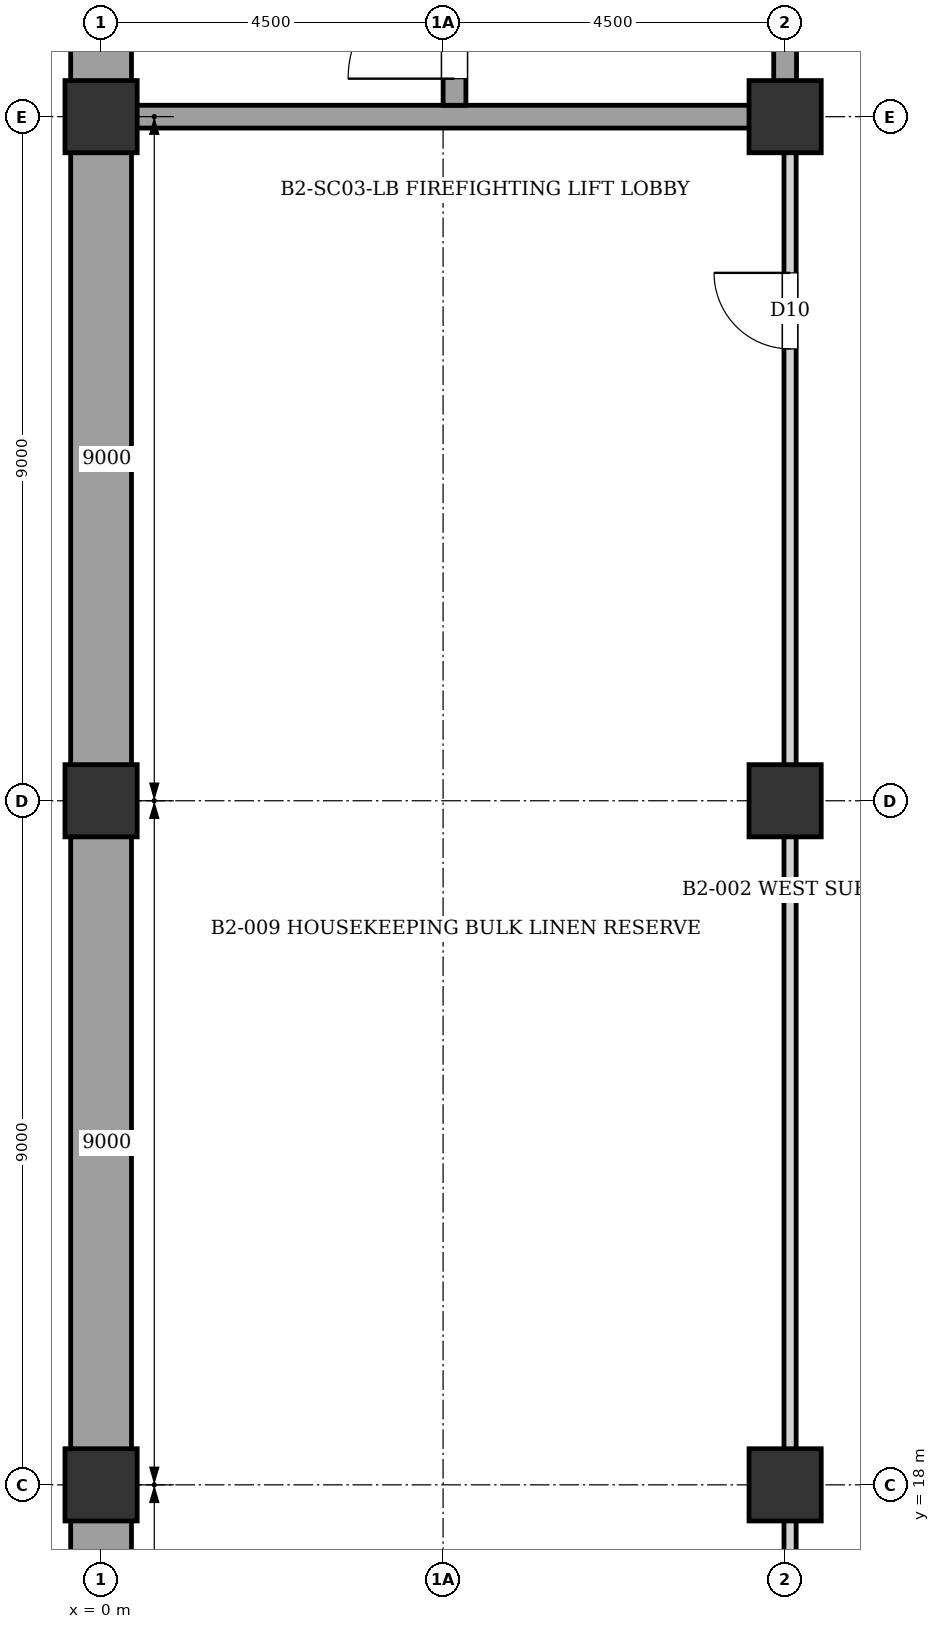
"""IFC4 building model, lengths in metres.
Left out: names, types, materials, properties, quantities, classifications, styles, units other than length and angle.
Written with IfcOpenShell. Run it as: python <this file> out.ifc"""

import sys

from ifc_helpers import new_model, si_unit, direction, frame, frame_2d, origin, origin_2d, place, context, subcontext, project, spatial, rectangle, extrude, element, fill, save


model = new_model("IFC4")
c1 = context("Model", 3, precision=1e-05, world=origin(), true_north=direction((0.0, 1.0)))
c2 = subcontext(c1, "Body", "Model", "MODEL_VIEW")
j1 = project(units=[si_unit("LENGTHUNIT", "METRE"), si_unit("PLANEANGLEUNIT", "RADIAN")], contexts=[c1])
p1 = place(None, origin())
s1 = spatial("IfcSite", under=j1, at=p1, CompositionType="ELEMENT")
p2 = place(p1, origin())
s2 = spatial("IfcBuilding", under=s1, at=p2, CompositionType="ELEMENT")
p3 = place(p2, frame((0.0, 0.0, -8.96)))
s3 = spatial("IfcBuildingStorey", under=s2, at=p3, CompositionType="ELEMENT", Elevation=-8.96)
for number, where, z_axis, x_axis in (
    (1, (0.0, 18.0, 0.0), (0.0, 0.0, 1.0), (1.0, 0.0, 0.0)),
    (2, (0.0, 27.0, 0.0), (0.0, 0.0, 1.0), (1.0, 0.0, 0.0)),
    (3, (0.0, 36.0, 0.0), (0.0, 0.0, 1.0), (1.0, 0.0, 0.0)),
    (4, (9.0, 18.0, 0.0), (0.0, 0.0, 1.0), (1.0, 0.0, 0.0)),
    (5, (9.0, 27.0, 0.0), (0.0, 0.0, 1.0), (1.0, 0.0, 0.0)),
    (6, (9.0, 36.0, 0.0), (0.0, 0.0, 1.0), (1.0, 0.0, 0.0)),
):
    element("IfcColumn", number, at=place(p3, frame(where, z_axis=z_axis, x_axis=x_axis)), inside=s3, PredefinedType="COLUMN", context=c2, shape_type="SweptSolid", body=[
        extrude(rectangle(XDim=0.95, YDim=0.95, at=origin_2d()), origin(), (0.0, 0.0, 1.0), 4.48),
    ])
for number, where, z_axis, x_axis in (
    (7, (0.0, 9.0, 0.0), (0.0, 0.0, 1.0), (0.0, 1.0, 0.0)),
    (8, (0.0, 18.0, 0.0), (0.0, 0.0, 1.0), (0.0, 1.0, 0.0)),
    (9, (0.0, 27.0, 0.0), (0.0, 0.0, 1.0), (0.0, 1.0, 0.0)),
    (10, (0.0, 36.0, 0.0), (0.0, 0.0, 1.0), (0.0, 1.0, 0.0)),
):
    element("IfcWall", number, at=place(p3, frame(where, z_axis=z_axis, x_axis=x_axis)), inside=s3, PredefinedType="USERDEFINED", context=c2, shape_type="SweptSolid", body=[
        extrude(rectangle(XDim=9.0, YDim=0.8, at=frame_2d((4.5, 0.0))), origin(), (0.0, 0.0, 1.0), 4.2),
    ])
p4 = place(p3, frame((0.0, 36.0, 0.0), z_axis=(0.0, 0.0, 1.0), x_axis=(1.0, 0.0, 0.0)))
e11 = element("IfcWall", 11, at=p4, inside=s3, PredefinedType="SHEAR", context=c2, shape_type="SweptSolid", body=[
    extrude(rectangle(XDim=9.0, YDim=0.3, at=frame_2d((4.5, 0.0))), origin(), (0.0, 0.0, 1.0), 4.2),
])
p5 = place(p3, frame((9.0, 36.0, 0.0), z_axis=(0.0, 0.0, 1.0), x_axis=(0.0, 1.0, 0.0)))
e12 = element("IfcWall", 12, at=p5, inside=s3, PredefinedType="SHEAR", context=c2, shape_type="SweptSolid", body=[
    extrude(rectangle(XDim=9.0, YDim=0.3, at=frame_2d((4.5, 0.0))), origin(), (0.0, 0.0, 1.0), 4.2),
])
p6 = place(p5, frame((1.95, 0.0, 0.0)))
e13 = element("IfcOpeningElement", 13, at=p6, cuts=e12, PredefinedType="OPENING", context=c2, shape_type="SweptSolid", body=[
    extrude(rectangle(XDim=1.6, YDim=2.1, at=frame_2d((0.8, 1.05))), frame((0.0, 0.16, 0.0), z_axis=(0.0, -1.0, 0.0), x_axis=(1.0, 0.0, 0.0)), (0.0, 0.0, 1.0), 0.32),
])
p7 = place(p3, frame((4.65, 36.15, 0.0), z_axis=(0.0, 0.0, 1.0), x_axis=(0.0, 1.0, 0.0)))
e14 = element("IfcWall", 14, at=p7, inside=s3, PredefinedType="SHEAR", context=c2, shape_type="SweptSolid", body=[
    extrude(rectangle(XDim=8.7, YDim=0.3, at=frame_2d((4.35, 0.0))), origin(), (0.0, 0.0, 1.0), 4.2),
])
p8 = place(p7, frame((0.35, 0.0, 0.0)))
e15 = element("IfcOpeningElement", 15, at=p8, cuts=e14, PredefinedType="OPENING", context=c2, shape_type="SweptSolid", body=[
    extrude(rectangle(XDim=1.4, YDim=2.02, at=frame_2d((0.7, 1.01))), frame((0.0, 0.16, 0.0), z_axis=(0.0, -1.0, 0.0), x_axis=(1.0, 0.0, 0.0)), (0.0, 0.0, 1.0), 0.32),
])
p9 = place(p3, frame((9.065, 12.005, 0.0), z_axis=(0.0, 0.0, 1.0), x_axis=(0.0, 1.0, 0.0)))
e16 = element("IfcWall", 16, at=p9, inside=s3, PredefinedType="PARTITIONING", context=c2, shape_type="SweptSolid", body=[
    extrude(rectangle(XDim=5.725, YDim=0.16, at=frame_2d((2.863, 0.0))), origin(), (0.0, 0.0, 1.0), 3.3),
])
p10 = place(p9, frame((1.676, 0.0, 0.0)))
e17 = element("IfcOpeningElement", 17, at=p10, cuts=e16, PredefinedType="OPENING", context=c2, shape_type="SweptSolid", body=[
    extrude(rectangle(XDim=1.0, YDim=2.1, at=frame_2d((0.5, 1.05))), frame((0.0, 0.09, 0.0), z_axis=(0.0, -1.0, 0.0), x_axis=(1.0, 0.0, 0.0)), (0.0, 0.0, 1.0), 0.18),
])
p11 = place(p3, frame((9.065, 18.07, 0.0), z_axis=(0.0, 0.0, 1.0), x_axis=(0.0, 1.0, 0.0)))
e18 = element("IfcWall", 18, at=p11, inside=s3, PredefinedType="PARTITIONING", context=c2, shape_type="SweptSolid", body=[
    extrude(rectangle(XDim=17.775, YDim=0.16, at=frame_2d((8.887, 0.0))), origin(), (0.0, 0.0, 1.0), 3.3),
])
p12 = place(p11, frame((14.875, 0.0, 0.0)))
e19 = element("IfcOpeningElement", 19, at=p12, cuts=e18, PredefinedType="OPENING", context=c2, shape_type="SweptSolid", body=[
    extrude(rectangle(XDim=1.0, YDim=2.1, at=frame_2d((0.5, 1.05))), frame((0.0, 0.09, 0.0), z_axis=(0.0, -1.0, 0.0), x_axis=(1.0, 0.0, 0.0)), (0.0, 0.0, 1.0), 0.18),
])
p13 = place(p8, origin())
e20 = element("IfcDoor", 20, at=p13, inside=s3, OperationType="SINGLE_SWING_LEFT", PredefinedType="DOOR", context=c2, shape_type="SweptSolid", body=[
    extrude(rectangle(XDim=1.4, YDim=2.02, at=frame_2d((0.7, 1.01))), frame((0.0, 0.025, 0.0), z_axis=(0.0, -1.0, 0.0), x_axis=(1.0, 0.0, 0.0)), (0.0, 0.0, 1.0), 0.05),
])
fill(e15, e20)
p14 = place(p12, origin())
e21 = element("IfcDoor", 21, at=p14, inside=s3, OperationType="SINGLE_SWING_RIGHT", PredefinedType="DOOR", context=c2, shape_type="SweptSolid", body=[
    extrude(rectangle(XDim=1.0, YDim=2.1, at=frame_2d((0.5, 1.05))), frame((0.0, 0.025, 0.0), z_axis=(0.0, -1.0, 0.0), x_axis=(1.0, 0.0, 0.0)), (0.0, 0.0, 1.0), 0.05),
])
fill(e19, e21)
save(model, sys.argv[1])
